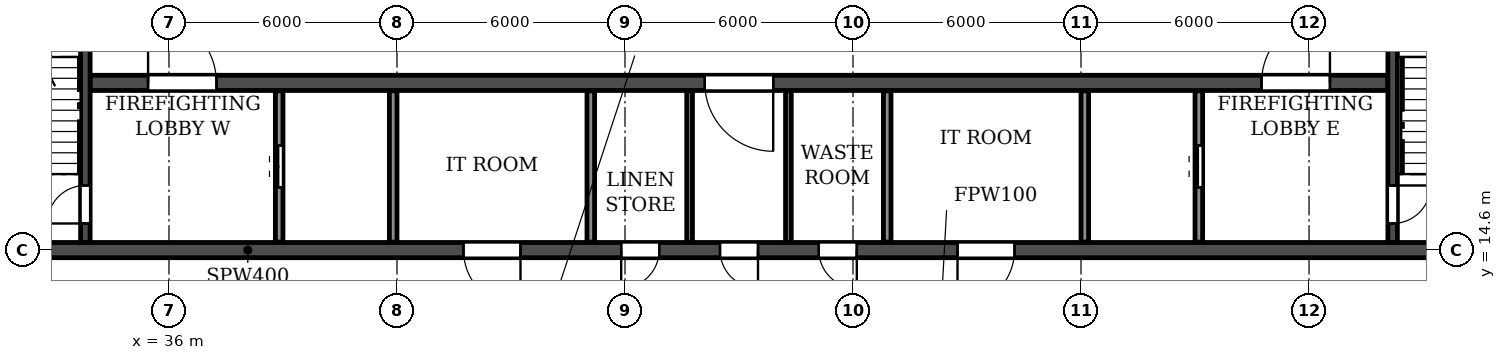
"""IFC4 building model, lengths in metres.
Left out: names, types, materials, properties, quantities, classifications, styles, units other than length and angle.
Written with IfcOpenShell. Run it as: python <this file> out.ifc"""

import sys

from ifc_helpers import new_model, si_unit, direction, frame, frame_2d, origin, place, context, subcontext, project, spatial, rectangle, extrude, element, fill, save


model = new_model("IFC4")
c1 = context("Model", 3, precision=1e-05, world=origin(), true_north=direction((0.0, 1.0)))
c2 = subcontext(c1, "Body", "Model", "MODEL_VIEW")
j1 = project(units=[si_unit("LENGTHUNIT", "METRE"), si_unit("PLANEANGLEUNIT", "RADIAN")], contexts=[c1])
p1 = place(None, origin())
s1 = spatial("IfcSite", under=j1, at=p1, CompositionType="ELEMENT")
p2 = place(p1, origin())
s2 = spatial("IfcBuilding", under=s1, at=p2, CompositionType="ELEMENT")
p3 = place(p2, frame((0.0, 0.0, 191.7)))
s3 = spatial("IfcBuildingStorey", under=s2, at=p3, CompositionType="ELEMENT", Elevation=191.7)
p4 = place(p3, frame((18.2, 14.6, 0.0), z_axis=(0.0, 0.0, 1.0), x_axis=(1.0, 0.0, 0.0)))
e1 = element("IfcWall", 1, at=p4, inside=s3, PredefinedType="SOLIDWALL", context=c2, shape_type="SweptSolid", body=[
    extrude(rectangle(XDim=65.6, YDim=0.4, at=frame_2d((32.8, 0.0))), origin(), (0.0, 0.0, 1.0), 3.08),
])
p5 = place(p4, frame((0.7, 0.0, 0.0)))
e2 = element("IfcOpeningElement", 2, at=p5, cuts=e1, PredefinedType="OPENING", context=c2, shape_type="SweptSolid", body=[
    extrude(rectangle(XDim=1.0, YDim=2.1, at=frame_2d((0.5, 1.05))), frame((0.0, 0.21, 0.0), z_axis=(0.0, -1.0, 0.0), x_axis=(1.0, 0.0, 0.0)), (0.0, 0.0, 1.0), 0.42),
])
p6 = place(p4, frame((8.6, 0.0, 0.0)))
e3 = element("IfcOpeningElement", 3, at=p6, cuts=e1, PredefinedType="OPENING", context=c2, shape_type="SweptSolid", body=[
    extrude(rectangle(XDim=1.0, YDim=2.1, at=frame_2d((0.5, 1.05))), frame((0.0, 0.21, 0.0), z_axis=(0.0, -1.0, 0.0), x_axis=(1.0, 0.0, 0.0)), (0.0, 0.0, 1.0), 0.42),
])
p7 = place(p4, frame((13.2, 0.0, 0.0)))
e4 = element("IfcOpeningElement", 4, at=p7, cuts=e1, PredefinedType="OPENING", context=c2, shape_type="SweptSolid", body=[
    extrude(rectangle(XDim=1.0, YDim=2.1, at=frame_2d((0.5, 1.05))), frame((0.0, 0.21, 0.0), z_axis=(0.0, -1.0, 0.0), x_axis=(1.0, 0.0, 0.0)), (0.0, 0.0, 1.0), 0.42),
])
p8 = place(p4, frame((25.55, 0.0, 0.0)))
e5 = element("IfcOpeningElement", 5, at=p8, cuts=e1, PredefinedType="OPENING", context=c2, shape_type="SweptSolid", body=[
    extrude(rectangle(XDim=1.5, YDim=2.1, at=frame_2d((0.75, 1.05))), frame((0.0, 0.21, 0.0), z_axis=(0.0, -1.0, 0.0), x_axis=(1.0, 0.0, 0.0)), (0.0, 0.0, 1.0), 0.42),
])
p9 = place(p4, frame((29.7, 0.0, 0.0)))
e6 = element("IfcOpeningElement", 6, at=p9, cuts=e1, PredefinedType="OPENING", context=c2, shape_type="SweptSolid", body=[
    extrude(rectangle(XDim=1.0, YDim=2.1, at=frame_2d((0.5, 1.05))), frame((0.0, 0.21, 0.0), z_axis=(0.0, -1.0, 0.0), x_axis=(1.0, 0.0, 0.0)), (0.0, 0.0, 1.0), 0.42),
])
p10 = place(p4, frame((32.3, 0.0, 0.0)))
e7 = element("IfcOpeningElement", 7, at=p10, cuts=e1, PredefinedType="OPENING", context=c2, shape_type="SweptSolid", body=[
    extrude(rectangle(XDim=1.0, YDim=2.1, at=frame_2d((0.5, 1.05))), frame((0.0, 0.21, 0.0), z_axis=(0.0, -1.0, 0.0), x_axis=(1.0, 0.0, 0.0)), (0.0, 0.0, 1.0), 0.42),
])
p11 = place(p4, frame((34.9, 0.0, 0.0)))
e8 = element("IfcOpeningElement", 8, at=p11, cuts=e1, PredefinedType="OPENING", context=c2, shape_type="SweptSolid", body=[
    extrude(rectangle(XDim=1.0, YDim=2.1, at=frame_2d((0.5, 1.05))), frame((0.0, 0.21, 0.0), z_axis=(0.0, -1.0, 0.0), x_axis=(1.0, 0.0, 0.0)), (0.0, 0.0, 1.0), 0.42),
])
p12 = place(p4, frame((38.55, 0.0, 0.0)))
e9 = element("IfcOpeningElement", 9, at=p12, cuts=e1, PredefinedType="OPENING", context=c2, shape_type="SweptSolid", body=[
    extrude(rectangle(XDim=1.5, YDim=2.1, at=frame_2d((0.75, 1.05))), frame((0.0, 0.21, 0.0), z_axis=(0.0, -1.0, 0.0), x_axis=(1.0, 0.0, 0.0)), (0.0, 0.0, 1.0), 0.42),
])
p13 = place(p4, frame((51.4, 0.0, 0.0)))
e10 = element("IfcOpeningElement", 10, at=p13, cuts=e1, PredefinedType="OPENING", context=c2, shape_type="SweptSolid", body=[
    extrude(rectangle(XDim=1.0, YDim=2.1, at=frame_2d((0.5, 1.05))), frame((0.0, 0.21, 0.0), z_axis=(0.0, -1.0, 0.0), x_axis=(1.0, 0.0, 0.0)), (0.0, 0.0, 1.0), 0.42),
])
p14 = place(p4, frame((56.0, 0.0, 0.0)))
e11 = element("IfcOpeningElement", 11, at=p14, cuts=e1, PredefinedType="OPENING", context=c2, shape_type="SweptSolid", body=[
    extrude(rectangle(XDim=1.0, YDim=2.1, at=frame_2d((0.5, 1.05))), frame((0.0, 0.21, 0.0), z_axis=(0.0, -1.0, 0.0), x_axis=(1.0, 0.0, 0.0)), (0.0, 0.0, 1.0), 0.42),
])
p15 = place(p4, frame((63.9, 0.0, 0.0)))
e12 = element("IfcOpeningElement", 12, at=p15, cuts=e1, PredefinedType="OPENING", context=c2, shape_type="SweptSolid", body=[
    extrude(rectangle(XDim=1.0, YDim=2.1, at=frame_2d((0.5, 1.05))), frame((0.0, 0.21, 0.0), z_axis=(0.0, -1.0, 0.0), x_axis=(1.0, 0.0, 0.0)), (0.0, 0.0, 1.0), 0.42),
])
p16 = place(p3, frame((33.925, 19.0, 0.0), z_axis=(0.0, 0.0, 1.0), x_axis=(1.0, 0.0, 0.0)))
e13 = element("IfcWall", 13, at=p16, inside=s3, PredefinedType="SOLIDWALL", context=c2, shape_type="SweptSolid", body=[
    extrude(rectangle(XDim=34.15, YDim=0.4, at=frame_2d((17.075, 0.0))), origin(), (0.0, 0.0, 1.0), 3.08),
])
p17 = place(p16, frame((16.175, 0.0, 0.0)))
e14 = element("IfcOpeningElement", 14, at=p17, cuts=e13, PredefinedType="OPENING", context=c2, shape_type="SweptSolid", body=[
    extrude(rectangle(XDim=1.8, YDim=2.1, at=frame_2d((0.9, 1.05))), frame((0.0, 0.21, 0.0), z_axis=(0.0, -1.0, 0.0), x_axis=(1.0, 0.0, 0.0)), (0.0, 0.0, 1.0), 0.42),
])
p18 = place(p16, frame((1.525, 0.0, 0.0)))
e15 = element("IfcOpeningElement", 15, at=p18, cuts=e13, PredefinedType="OPENING", context=c2, shape_type="SweptSolid", body=[
    extrude(rectangle(XDim=1.8, YDim=2.1, at=frame_2d((0.9, 1.05))), frame((0.0, 0.21, 0.0), z_axis=(0.0, -1.0, 0.0), x_axis=(1.0, 0.0, 0.0)), (0.0, 0.0, 1.0), 0.42),
])
p19 = place(p16, frame((30.825, 0.0, 0.0)))
e16 = element("IfcOpeningElement", 16, at=p19, cuts=e13, PredefinedType="OPENING", context=c2, shape_type="SweptSolid", body=[
    extrude(rectangle(XDim=1.8, YDim=2.1, at=frame_2d((0.9, 1.05))), frame((0.0, 0.21, 0.0), z_axis=(0.0, -1.0, 0.0), x_axis=(1.0, 0.0, 0.0)), (0.0, 0.0, 1.0), 0.42),
])
p20 = place(p3, frame((33.8, 14.8, 0.0), z_axis=(0.0, 0.0, 1.0), x_axis=(0.0, 1.0, 0.0)))
e17 = element("IfcWall", 17, at=p20, inside=s3, PredefinedType="SOLIDWALL", context=c2, shape_type="SweptSolid", body=[
    extrude(rectangle(XDim=7.675, YDim=0.25, at=frame_2d((3.837, 0.0))), origin(), (0.0, 0.0, 1.0), 3.08),
])
p21 = place(p20, frame((0.5, 0.0, 0.0)))
e18 = element("IfcOpeningElement", 18, at=p21, cuts=e17, PredefinedType="OPENING", context=c2, shape_type="SweptSolid", body=[
    extrude(rectangle(XDim=1.0, YDim=2.1, at=frame_2d((0.5, 1.05))), frame((0.0, 0.135, 0.0), z_axis=(0.0, -1.0, 0.0), x_axis=(1.0, 0.0, 0.0)), (0.0, 0.0, 1.0), 0.27),
])
p22 = place(p3, frame((68.2, 14.8, 0.0), z_axis=(0.0, 0.0, 1.0), x_axis=(0.0, 1.0, 0.0)))
e19 = element("IfcWall", 19, at=p22, inside=s3, PredefinedType="SOLIDWALL", context=c2, shape_type="SweptSolid", body=[
    extrude(rectangle(XDim=7.675, YDim=0.25, at=frame_2d((3.837, 0.0))), origin(), (0.0, 0.0, 1.0), 3.08),
])
p23 = place(p22, frame((0.5, 0.0, 0.0)))
e20 = element("IfcOpeningElement", 20, at=p23, cuts=e19, PredefinedType="OPENING", context=c2, shape_type="SweptSolid", body=[
    extrude(rectangle(XDim=1.0, YDim=2.1, at=frame_2d((0.5, 1.05))), frame((0.0, 0.135, 0.0), z_axis=(0.0, -1.0, 0.0), x_axis=(1.0, 0.0, 0.0)), (0.0, 0.0, 1.0), 0.27),
])
for number, where, z_axis, x_axis in (
    (21, (49.7, 14.81, 0.0), (0.0, 0.0, 1.0), (0.0, 1.0, 0.0)),
    (22, (52.3, 14.81, 0.0), (0.0, 0.0, 1.0), (0.0, 1.0, 0.0)),
):
    element("IfcWall", number, at=place(p3, frame(where, z_axis=z_axis, x_axis=x_axis)), inside=s3, PredefinedType="PARTITIONING", context=c2, shape_type="SweptSolid", body=[
        extrude(rectangle(XDim=3.98, YDim=0.15, at=frame_2d((1.99, 0.0))), origin(), (0.0, 0.0, 1.0), 3.08),
    ])
for number, where, z_axis, x_axis in (
    (23, (47.1, 14.81, 0.0), (0.0, 0.0, 1.0), (0.0, 1.0, 0.0)),
    (24, (54.9, 14.81, 0.0), (0.0, 0.0, 1.0), (0.0, 1.0, 0.0)),
):
    element("IfcWall", number, at=place(p3, frame(where, z_axis=z_axis, x_axis=x_axis)), inside=s3, PredefinedType="PARTITIONING", context=c2, shape_type="SweptSolid", body=[
        extrude(rectangle(XDim=3.98, YDim=0.2, at=frame_2d((1.99, 0.0))), origin(), (0.0, 0.0, 1.0), 3.08),
    ])
p24 = place(p3, frame((38.9, 14.81, 0.0), z_axis=(0.0, 0.0, 1.0), x_axis=(0.0, 1.0, 0.0)))
e25 = element("IfcWall", 25, at=p24, inside=s3, PredefinedType="PARTITIONING", context=c2, shape_type="SweptSolid", body=[
    extrude(rectangle(XDim=3.98, YDim=0.2, at=frame_2d((1.99, 0.0))), origin(), (0.0, 0.0, 1.0), 3.08),
])
p25 = place(p24, frame((1.44, 0.0, 0.0)))
e26 = element("IfcOpeningElement", 26, at=p25, cuts=e25, PredefinedType="OPENING", context=c2, shape_type="SweptSolid", body=[
    extrude(rectangle(XDim=1.1, YDim=2.1, at=frame_2d((0.55, 1.05))), frame((0.0, 0.11, 0.0), z_axis=(0.0, -1.0, 0.0), x_axis=(1.0, 0.0, 0.0)), (0.0, 0.0, 1.0), 0.22),
])
for number, where, z_axis, x_axis in (
    (27, (41.9, 14.81, 0.0), (0.0, 0.0, 1.0), (0.0, 1.0, 0.0)),
    (28, (60.1, 14.81, 0.0), (0.0, 0.0, 1.0), (0.0, 1.0, 0.0)),
):
    element("IfcWall", number, at=place(p3, frame(where, z_axis=z_axis, x_axis=x_axis)), inside=s3, PredefinedType="PARTITIONING", context=c2, shape_type="SweptSolid", body=[
        extrude(rectangle(XDim=3.98, YDim=0.2, at=frame_2d((1.99, 0.0))), origin(), (0.0, 0.0, 1.0), 3.08),
    ])
p26 = place(p3, frame((63.1, 14.81, 0.0), z_axis=(0.0, 0.0, 1.0), x_axis=(0.0, 1.0, 0.0)))
e29 = element("IfcWall", 29, at=p26, inside=s3, PredefinedType="PARTITIONING", context=c2, shape_type="SweptSolid", body=[
    extrude(rectangle(XDim=3.98, YDim=0.2, at=frame_2d((1.99, 0.0))), origin(), (0.0, 0.0, 1.0), 3.08),
])
p27 = place(p26, frame((1.44, 0.0, 0.0)))
e30 = element("IfcOpeningElement", 30, at=p27, cuts=e29, PredefinedType="OPENING", context=c2, shape_type="SweptSolid", body=[
    extrude(rectangle(XDim=1.1, YDim=2.1, at=frame_2d((0.55, 1.05))), frame((0.0, 0.11, 0.0), z_axis=(0.0, -1.0, 0.0), x_axis=(1.0, 0.0, 0.0)), (0.0, 0.0, 1.0), 0.22),
])
p28 = place(p8, frame((1.5, 0.0, 0.0), z_axis=(0.0, 0.0, 1.0), x_axis=(-1.0, 0.0, 0.0)))
e31 = element("IfcDoor", 31, at=p28, inside=s3, OperationType="DOUBLE_DOOR_SINGLE_SWING", PredefinedType="DOOR", context=c2, shape_type="SweptSolid", body=[
    extrude(rectangle(XDim=1.5, YDim=2.1, at=frame_2d((0.75, 1.05))), frame((0.0, 0.025, 0.0), z_axis=(0.0, -1.0, 0.0), x_axis=(1.0, 0.0, 0.0)), (0.0, 0.0, 1.0), 0.05),
])
fill(e5, e31)
p29 = place(p9, frame((1.0, 0.0, 0.0), z_axis=(0.0, 0.0, 1.0), x_axis=(-1.0, 0.0, 0.0)))
e32 = element("IfcDoor", 32, at=p29, inside=s3, OperationType="SINGLE_SWING_RIGHT", PredefinedType="DOOR", context=c2, shape_type="SweptSolid", body=[
    extrude(rectangle(XDim=1.0, YDim=2.1, at=frame_2d((0.5, 1.05))), frame((0.0, 0.025, 0.0), z_axis=(0.0, -1.0, 0.0), x_axis=(1.0, 0.0, 0.0)), (0.0, 0.0, 1.0), 0.05),
])
fill(e6, e32)
p30 = place(p10, frame((1.0, 0.0, 0.0), z_axis=(0.0, 0.0, 1.0), x_axis=(-1.0, 0.0, 0.0)))
e33 = element("IfcDoor", 33, at=p30, inside=s3, OperationType="SINGLE_SWING_LEFT", PredefinedType="DOOR", context=c2, shape_type="SweptSolid", body=[
    extrude(rectangle(XDim=1.0, YDim=2.1, at=frame_2d((0.5, 1.05))), frame((0.0, 0.025, 0.0), z_axis=(0.0, -1.0, 0.0), x_axis=(1.0, 0.0, 0.0)), (0.0, 0.0, 1.0), 0.05),
])
fill(e7, e33)
p31 = place(p11, frame((1.0, 0.0, 0.0), z_axis=(0.0, 0.0, 1.0), x_axis=(-1.0, 0.0, 0.0)))
e34 = element("IfcDoor", 34, at=p31, inside=s3, OperationType="SINGLE_SWING_LEFT", PredefinedType="DOOR", context=c2, shape_type="SweptSolid", body=[
    extrude(rectangle(XDim=1.0, YDim=2.1, at=frame_2d((0.5, 1.05))), frame((0.0, 0.025, 0.0), z_axis=(0.0, -1.0, 0.0), x_axis=(1.0, 0.0, 0.0)), (0.0, 0.0, 1.0), 0.05),
])
fill(e8, e34)
p32 = place(p12, frame((1.5, 0.0, 0.0), z_axis=(0.0, 0.0, 1.0), x_axis=(-1.0, 0.0, 0.0)))
e35 = element("IfcDoor", 35, at=p32, inside=s3, OperationType="DOUBLE_DOOR_SINGLE_SWING", PredefinedType="DOOR", context=c2, shape_type="SweptSolid", body=[
    extrude(rectangle(XDim=1.5, YDim=2.1, at=frame_2d((0.75, 1.05))), frame((0.0, 0.025, 0.0), z_axis=(0.0, -1.0, 0.0), x_axis=(1.0, 0.0, 0.0)), (0.0, 0.0, 1.0), 0.05),
])
fill(e9, e35)
p33 = place(p27, origin())
e36 = element("IfcDoor", 36, at=p33, inside=s3, OperationType="DOUBLE_DOOR_SLIDING", PredefinedType="DOOR", context=c2, shape_type="SweptSolid", body=[
    extrude(rectangle(XDim=1.1, YDim=2.1, at=frame_2d((0.55, 1.05))), frame((0.0, 0.025, 0.0), z_axis=(0.0, -1.0, 0.0), x_axis=(1.0, 0.0, 0.0)), (0.0, 0.0, 1.0), 0.05),
])
fill(e30, e36)
p34 = place(p23, frame((1.0, 0.0, 0.0), z_axis=(0.0, 0.0, 1.0), x_axis=(-1.0, 0.0, 0.0)))
e37 = element("IfcDoor", 37, at=p34, inside=s3, OperationType="SINGLE_SWING_LEFT", PredefinedType="DOOR", context=c2, shape_type="SweptSolid", body=[
    extrude(rectangle(XDim=1.0, YDim=2.1, at=frame_2d((0.5, 1.05))), frame((0.0, 0.025, 0.0), z_axis=(0.0, -1.0, 0.0), x_axis=(1.0, 0.0, 0.0)), (0.0, 0.0, 1.0), 0.05),
])
fill(e20, e37)
p35 = place(p21, origin())
e38 = element("IfcDoor", 38, at=p35, inside=s3, OperationType="SINGLE_SWING_LEFT", PredefinedType="DOOR", context=c2, shape_type="SweptSolid", body=[
    extrude(rectangle(XDim=1.0, YDim=2.1, at=frame_2d((0.5, 1.05))), frame((0.0, 0.025, 0.0), z_axis=(0.0, -1.0, 0.0), x_axis=(1.0, 0.0, 0.0)), (0.0, 0.0, 1.0), 0.05),
])
fill(e18, e38)
p36 = place(p25, origin())
e39 = element("IfcDoor", 39, at=p36, inside=s3, OperationType="DOUBLE_DOOR_SLIDING", PredefinedType="DOOR", context=c2, shape_type="SweptSolid", body=[
    extrude(rectangle(XDim=1.1, YDim=2.1, at=frame_2d((0.55, 1.05))), frame((0.0, 0.025, 0.0), z_axis=(0.0, -1.0, 0.0), x_axis=(1.0, 0.0, 0.0)), (0.0, 0.0, 1.0), 0.05),
])
fill(e26, e39)
p37 = place(p17, frame((1.8, 0.0, 0.0), z_axis=(0.0, 0.0, 1.0), x_axis=(-1.0, 0.0, 0.0)))
e40 = element("IfcDoor", 40, at=p37, inside=s3, OperationType="DOUBLE_DOOR_SINGLE_SWING", PredefinedType="DOOR", context=c2, shape_type="SweptSolid", body=[
    extrude(rectangle(XDim=1.8, YDim=2.1, at=frame_2d((0.9, 1.05))), frame((0.0, 0.025, 0.0), z_axis=(0.0, -1.0, 0.0), x_axis=(1.0, 0.0, 0.0)), (0.0, 0.0, 1.0), 0.05),
])
fill(e14, e40)
p38 = place(p18, origin())
e41 = element("IfcDoor", 41, at=p38, inside=s3, OperationType="DOUBLE_DOOR_SINGLE_SWING", PredefinedType="DOOR", context=c2, shape_type="SweptSolid", body=[
    extrude(rectangle(XDim=1.8, YDim=2.1, at=frame_2d((0.9, 1.05))), frame((0.0, 0.025, 0.0), z_axis=(0.0, -1.0, 0.0), x_axis=(1.0, 0.0, 0.0)), (0.0, 0.0, 1.0), 0.05),
])
fill(e15, e41)
p39 = place(p19, origin())
e42 = element("IfcDoor", 42, at=p39, inside=s3, OperationType="DOUBLE_DOOR_SINGLE_SWING", PredefinedType="DOOR", context=c2, shape_type="SweptSolid", body=[
    extrude(rectangle(XDim=1.8, YDim=2.1, at=frame_2d((0.9, 1.05))), frame((0.0, 0.025, 0.0), z_axis=(0.0, -1.0, 0.0), x_axis=(1.0, 0.0, 0.0)), (0.0, 0.0, 1.0), 0.05),
])
fill(e16, e42)
save(model, sys.argv[1])
